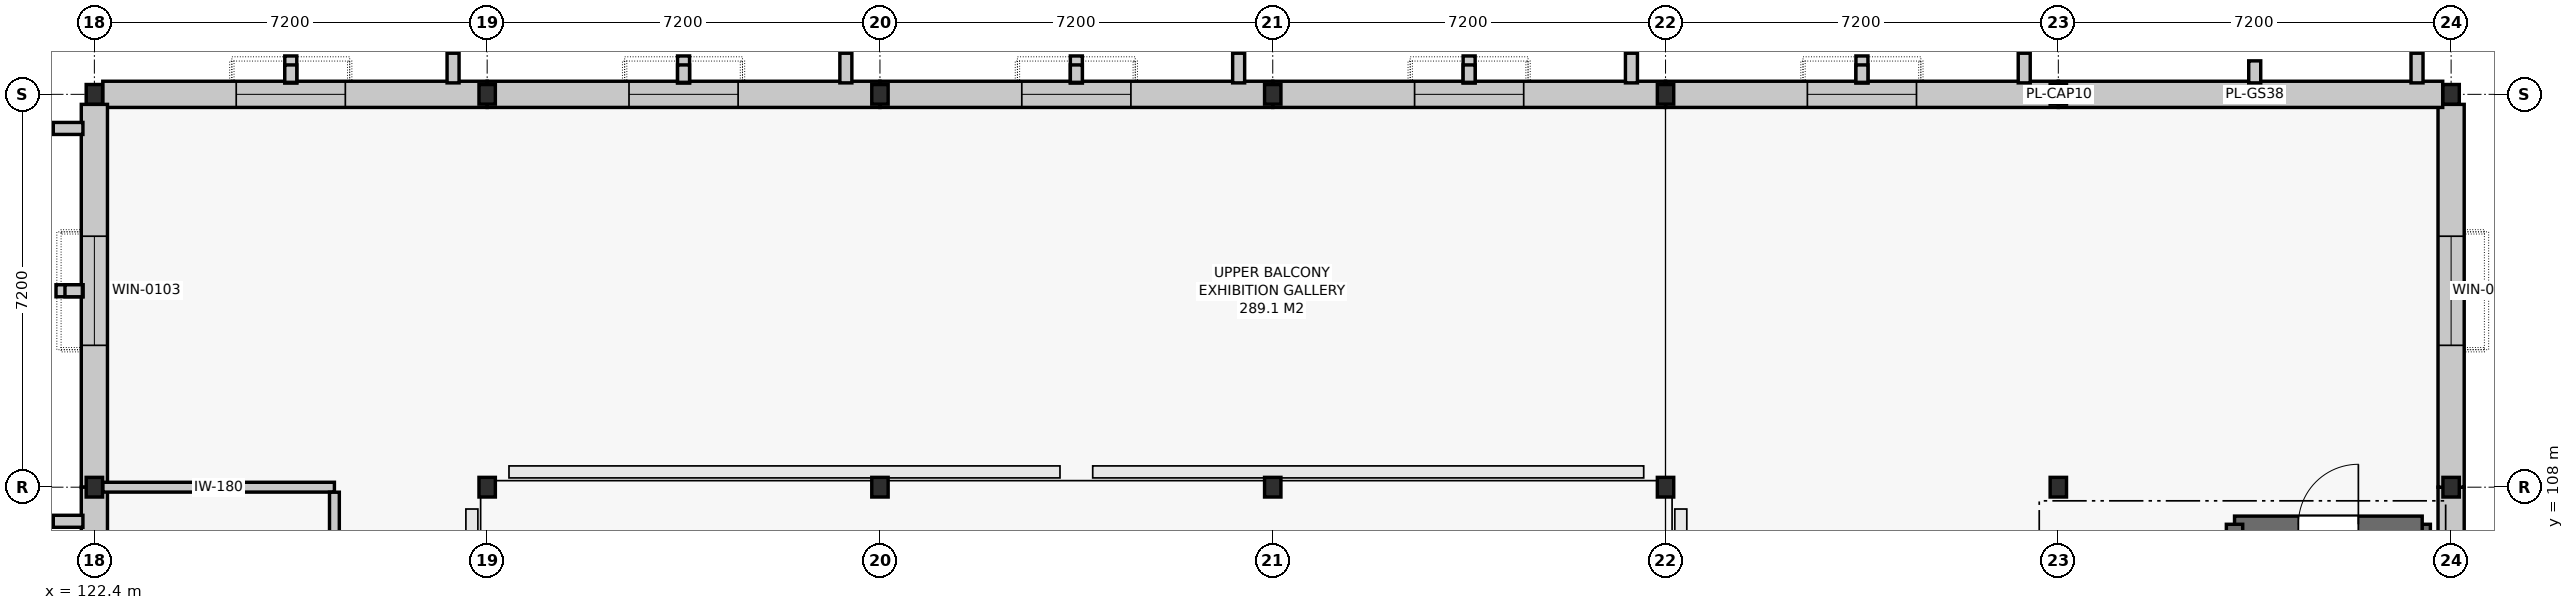
"""IFC4 building model, lengths in metres.
Left out: names, types, materials, properties, quantities, classifications, styles, units other than length and angle.
Written with IfcOpenShell. Run it as: python <this file> out.ifc"""

import sys

from ifc_helpers import new_model, si_unit, direction, frame, frame_2d, origin, origin_2d, place, context, subcontext, project, spatial, rectangle, i_section, extrude, element, fill, save


model = new_model("IFC4")
c1 = context("Model", 3, precision=1e-05, world=origin(), true_north=direction((0.0, 1.0)))
c2 = subcontext(c1, "Body", "Model", "MODEL_VIEW")
j1 = project(units=[si_unit("LENGTHUNIT", "METRE"), si_unit("PLANEANGLEUNIT", "RADIAN")], contexts=[c1])
p1 = place(None, origin())
s1 = spatial("IfcSite", under=j1, at=p1, CompositionType="ELEMENT")
p2 = place(p1, origin())
s2 = spatial("IfcBuilding", under=s1, at=p2, CompositionType="ELEMENT")
p3 = place(p2, frame((0.0, 0.0, 5.4)))
s3 = spatial("IfcBuildingStorey", under=s2, at=p3, CompositionType="ELEMENT", Elevation=5.4)
for number, where, z_axis, x_axis in (
    (1, (122.4, 108.0, 0.0), (0.0, 0.0, 1.0), (1.0, 0.0, 0.0)),
    (2, (122.4, 115.2, 0.0), (0.0, 0.0, 1.0), (1.0, 0.0, 0.0)),
    (3, (129.6, 108.0, 0.0), (0.0, 0.0, 1.0), (1.0, 0.0, 0.0)),
    (4, (129.6, 115.2, 0.0), (0.0, 0.0, 1.0), (1.0, 0.0, 0.0)),
    (5, (136.8, 108.0, 0.0), (0.0, 0.0, 1.0), (1.0, 0.0, 0.0)),
    (6, (136.8, 115.2, 0.0), (0.0, 0.0, 1.0), (1.0, 0.0, 0.0)),
    (7, (144.0, 108.0, 0.0), (0.0, 0.0, 1.0), (1.0, 0.0, 0.0)),
    (8, (144.0, 115.2, 0.0), (0.0, 0.0, 1.0), (1.0, 0.0, 0.0)),
    (9, (151.2, 108.0, 0.0), (0.0, 0.0, 1.0), (1.0, 0.0, 0.0)),
    (10, (151.2, 115.2, 0.0), (0.0, 0.0, 1.0), (1.0, 0.0, 0.0)),
    (11, (158.4, 108.0, 0.0), (0.0, 0.0, 1.0), (1.0, 0.0, 0.0)),
    (12, (158.4, 115.2, 0.0), (0.0, 0.0, 1.0), (1.0, 0.0, 0.0)),
    (13, (165.6, 108.0, 0.0), (0.0, 0.0, 1.0), (1.0, 0.0, 0.0)),
    (14, (165.6, 115.2, 0.0), (0.0, 0.0, 1.0), (1.0, 0.0, 0.0)),
):
    element("IfcColumn", number, at=place(p3, frame(where, z_axis=z_axis, x_axis=x_axis)), inside=s3, PredefinedType="COLUMN", context=c2, shape_type="SweptSolid", body=[
        extrude(i_section(OverallWidth=0.3, OverallDepth=0.36, WebThickness=0.012, FlangeThickness=0.022, FilletRadius=0.027, at=origin_2d()), origin(), (0.0, 0.0, 1.0), 4.8),
    ])
p4 = place(p3, frame((165.6, 100.8, 0.0), z_axis=(0.0, 0.0, 1.0), x_axis=(0.0, 1.0, 0.0)))
e15 = element("IfcWall", 15, at=p4, inside=s3, PredefinedType="SOLIDWALL", context=c2, shape_type="SweptSolid", body=[
    extrude(rectangle(XDim=7.2, YDim=0.48, at=frame_2d((3.6, 0.0))), origin(), (0.0, 0.0, 1.0), 3.8),
])
p5 = place(p4, frame((2.6, 0.0, 1.35)))
e16 = element("IfcOpeningElement", 16, at=p5, cuts=e15, PredefinedType="OPENING", context=c2, shape_type="SweptSolid", body=[
    extrude(rectangle(XDim=2.0, YDim=1.5, at=frame_2d((1.0, 0.75))), frame((0.0, 0.252, 0.0), z_axis=(0.0, -1.0, 0.0), x_axis=(1.0, 0.0, 0.0)), (0.0, 0.0, 1.0), 0.504),
])
p6 = place(p3, frame((165.6, 108.0, 0.0), z_axis=(0.0, 0.0, 1.0), x_axis=(0.0, 1.0, 0.0)))
e17 = element("IfcWall", 17, at=p6, inside=s3, PredefinedType="SOLIDWALL", context=c2, shape_type="SweptSolid", body=[
    extrude(rectangle(XDim=7.016, YDim=0.48, at=frame_2d((3.508, 0.0))), origin(), (0.0, 0.0, 1.0), 3.8),
])
p7 = place(p6, frame((2.6, 0.0, 1.35)))
e18 = element("IfcOpeningElement", 18, at=p7, cuts=e17, PredefinedType="OPENING", context=c2, shape_type="SweptSolid", body=[
    extrude(rectangle(XDim=2.0, YDim=1.5, at=frame_2d((1.0, 0.75))), frame((0.0, 0.252, 0.0), z_axis=(0.0, -1.0, 0.0), x_axis=(1.0, 0.0, 0.0)), (0.0, 0.0, 1.0), 0.504),
])
p8 = place(p3, frame((165.446, 115.2, 0.0), z_axis=(0.0, 0.0, 1.0), x_axis=(-1.0, 0.0, 0.0)))
e19 = element("IfcWall", 19, at=p8, inside=s3, PredefinedType="SOLIDWALL", context=c2, shape_type="SweptSolid", body=[
    extrude(rectangle(XDim=7.046, YDim=0.48, at=frame_2d((3.523, 0.0))), origin(), (0.0, 0.0, 1.0), 3.8),
])
p9 = place(p3, frame((158.4, 115.2, 0.0), z_axis=(0.0, 0.0, 1.0), x_axis=(-1.0, 0.0, 0.0)))
e20 = element("IfcWall", 20, at=p9, inside=s3, PredefinedType="SOLIDWALL", context=c2, shape_type="SweptSolid", body=[
    extrude(rectangle(XDim=7.2, YDim=0.48, at=frame_2d((3.6, 0.0))), origin(), (0.0, 0.0, 1.0), 3.8),
])
p10 = place(p9, frame((2.6, 0.0, 1.35)))
e21 = element("IfcOpeningElement", 21, at=p10, cuts=e20, PredefinedType="OPENING", context=c2, shape_type="SweptSolid", body=[
    extrude(rectangle(XDim=2.0, YDim=1.5, at=frame_2d((1.0, 0.75))), frame((0.0, 0.252, 0.0), z_axis=(0.0, -1.0, 0.0), x_axis=(1.0, 0.0, 0.0)), (0.0, 0.0, 1.0), 0.504),
])
p11 = place(p3, frame((151.2, 115.2, 0.0), z_axis=(0.0, 0.0, 1.0), x_axis=(-1.0, 0.0, 0.0)))
e22 = element("IfcWall", 22, at=p11, inside=s3, PredefinedType="SOLIDWALL", context=c2, shape_type="SweptSolid", body=[
    extrude(rectangle(XDim=7.2, YDim=0.48, at=frame_2d((3.6, 0.0))), origin(), (0.0, 0.0, 1.0), 3.8),
])
p12 = place(p11, frame((2.6, 0.0, 1.35)))
e23 = element("IfcOpeningElement", 23, at=p12, cuts=e22, PredefinedType="OPENING", context=c2, shape_type="SweptSolid", body=[
    extrude(rectangle(XDim=2.0, YDim=1.5, at=frame_2d((1.0, 0.75))), frame((0.0, 0.252, 0.0), z_axis=(0.0, -1.0, 0.0), x_axis=(1.0, 0.0, 0.0)), (0.0, 0.0, 1.0), 0.504),
])
p13 = place(p3, frame((144.0, 115.2, 0.0), z_axis=(0.0, 0.0, 1.0), x_axis=(-1.0, 0.0, 0.0)))
e24 = element("IfcWall", 24, at=p13, inside=s3, PredefinedType="SOLIDWALL", context=c2, shape_type="SweptSolid", body=[
    extrude(rectangle(XDim=7.2, YDim=0.48, at=frame_2d((3.6, 0.0))), origin(), (0.0, 0.0, 1.0), 3.8),
])
p14 = place(p13, frame((2.6, 0.0, 1.35)))
e25 = element("IfcOpeningElement", 25, at=p14, cuts=e24, PredefinedType="OPENING", context=c2, shape_type="SweptSolid", body=[
    extrude(rectangle(XDim=2.0, YDim=1.5, at=frame_2d((1.0, 0.75))), frame((0.0, 0.252, 0.0), z_axis=(0.0, -1.0, 0.0), x_axis=(1.0, 0.0, 0.0)), (0.0, 0.0, 1.0), 0.504),
])
p15 = place(p3, frame((136.8, 115.2, 0.0), z_axis=(0.0, 0.0, 1.0), x_axis=(-1.0, 0.0, 0.0)))
e26 = element("IfcWall", 26, at=p15, inside=s3, PredefinedType="SOLIDWALL", context=c2, shape_type="SweptSolid", body=[
    extrude(rectangle(XDim=7.2, YDim=0.48, at=frame_2d((3.6, 0.0))), origin(), (0.0, 0.0, 1.0), 3.8),
])
p16 = place(p15, frame((2.6, 0.0, 1.35)))
e27 = element("IfcOpeningElement", 27, at=p16, cuts=e26, PredefinedType="OPENING", context=c2, shape_type="SweptSolid", body=[
    extrude(rectangle(XDim=2.0, YDim=1.5, at=frame_2d((1.0, 0.75))), frame((0.0, 0.252, 0.0), z_axis=(0.0, -1.0, 0.0), x_axis=(1.0, 0.0, 0.0)), (0.0, 0.0, 1.0), 0.504),
])
p17 = place(p3, frame((129.6, 115.2, 0.0), z_axis=(0.0, 0.0, 1.0), x_axis=(-1.0, 0.0, 0.0)))
e28 = element("IfcWall", 28, at=p17, inside=s3, PredefinedType="SOLIDWALL", context=c2, shape_type="SweptSolid", body=[
    extrude(rectangle(XDim=7.046, YDim=0.48, at=frame_2d((3.523, 0.0))), origin(), (0.0, 0.0, 1.0), 3.8),
])
p18 = place(p17, frame((2.6, 0.0, 1.35)))
e29 = element("IfcOpeningElement", 29, at=p18, cuts=e28, PredefinedType="OPENING", context=c2, shape_type="SweptSolid", body=[
    extrude(rectangle(XDim=2.0, YDim=1.5, at=frame_2d((1.0, 0.75))), frame((0.0, 0.252, 0.0), z_axis=(0.0, -1.0, 0.0), x_axis=(1.0, 0.0, 0.0)), (0.0, 0.0, 1.0), 0.504),
])
p19 = place(p3, frame((122.4, 115.016, 0.0), z_axis=(0.0, 0.0, 1.0), x_axis=(0.0, -1.0, 0.0)))
e30 = element("IfcWall", 30, at=p19, inside=s3, PredefinedType="SOLIDWALL", context=c2, shape_type="SweptSolid", body=[
    extrude(rectangle(XDim=7.016, YDim=0.48, at=frame_2d((3.508, 0.0))), origin(), (0.0, 0.0, 1.0), 3.8),
])
p20 = place(p19, frame((2.416, 0.0, 1.35)))
e31 = element("IfcOpeningElement", 31, at=p20, cuts=e30, PredefinedType="OPENING", context=c2, shape_type="SweptSolid", body=[
    extrude(rectangle(XDim=2.0, YDim=1.5, at=frame_2d((1.0, 0.75))), frame((0.0, 0.252, 0.0), z_axis=(0.0, -1.0, 0.0), x_axis=(1.0, 0.0, 0.0)), (0.0, 0.0, 1.0), 0.504),
])
p21 = place(p3, frame((122.4, 108.0, 0.0), z_axis=(0.0, 0.0, 1.0), x_axis=(0.0, -1.0, 0.0)))
e32 = element("IfcWall", 32, at=p21, inside=s3, PredefinedType="SOLIDWALL", context=c2, shape_type="SweptSolid", body=[
    extrude(rectangle(XDim=7.2, YDim=0.48, at=frame_2d((3.6, 0.0))), origin(), (0.0, 0.0, 1.0), 3.8),
])
p22 = place(p21, frame((2.6, 0.0, 1.35)))
e33 = element("IfcOpeningElement", 33, at=p22, cuts=e32, PredefinedType="OPENING", context=c2, shape_type="SweptSolid", body=[
    extrude(rectangle(XDim=2.0, YDim=1.5, at=frame_2d((1.0, 0.75))), frame((0.0, 0.252, 0.0), z_axis=(0.0, -1.0, 0.0), x_axis=(1.0, 0.0, 0.0)), (0.0, 0.0, 1.0), 0.504),
])
p23 = place(p3, frame((165.07, 100.38, 0.0), z_axis=(0.0, 0.0, 1.0), x_axis=(0.0, 1.0, 0.0)))
e34 = element("IfcWall", 34, at=p23, inside=s3, PredefinedType="SHEAR", context=c2, shape_type="SweptSolid", body=[
    extrude(rectangle(XDim=6.94, YDim=0.3, at=frame_2d((3.47, 0.0))), origin(), (0.0, 0.0, 1.0), 4.52),
])
p24 = place(p3, frame((165.07, 107.32, 0.0), z_axis=(0.0, 0.0, 1.0), x_axis=(-1.0, 0.0, 0.0)))
e35 = element("IfcWall", 35, at=p24, inside=s3, PredefinedType="SHEAR", context=c2, shape_type="SweptSolid", body=[
    extrude(rectangle(XDim=3.44, YDim=0.3, at=frame_2d((1.72, 0.0))), origin(), (0.0, 0.0, 1.0), 4.52),
])
p25 = place(p24, frame((1.17, 0.0, 0.0)))
e36 = element("IfcOpeningElement", 36, at=p25, cuts=e35, PredefinedType="OPENING", context=c2, shape_type="SweptSolid", body=[
    extrude(rectangle(XDim=1.1, YDim=2.15, at=frame_2d((0.55, 1.075))), frame((0.0, 0.162, 0.0), z_axis=(0.0, -1.0, 0.0), x_axis=(1.0, 0.0, 0.0)), (0.0, 0.0, 1.0), 0.324),
])
p26 = place(p3, frame((161.63, 107.32, 0.0), z_axis=(0.0, 0.0, 1.0), x_axis=(0.0, -1.0, 0.0)))
e37 = element("IfcWall", 37, at=p26, inside=s3, PredefinedType="SHEAR", context=c2, shape_type="SweptSolid", body=[
    extrude(rectangle(XDim=6.94, YDim=0.3, at=frame_2d((3.47, 0.0))), origin(), (0.0, 0.0, 1.0), 4.52),
])
p27 = place(p3, frame((122.554, 108.0, 0.0), z_axis=(0.0, 0.0, 1.0), x_axis=(1.0, 0.0, 0.0)))
e38 = element("IfcWall", 38, at=p27, inside=s3, PredefinedType="PARTITIONING", context=c2, shape_type="SweptSolid", body=[
    extrude(rectangle(XDim=4.246, YDim=0.18, at=frame_2d((2.123, 0.0))), origin(), (0.0, 0.0, 1.0), 4.065),
])
p28 = place(p3, frame((126.8, 99.477, 0.0), z_axis=(0.0, 0.0, 1.0), x_axis=(0.0, 1.0, 0.0)))
e39 = element("IfcWall", 39, at=p28, inside=s3, PredefinedType="PARTITIONING", context=c2, shape_type="SweptSolid", body=[
    extrude(rectangle(XDim=8.431, YDim=0.18, at=frame_2d((4.215, 0.0))), origin(), (0.0, 0.0, 1.0), 4.065),
])
p29 = place(p28, frame((3.676, 0.0, 0.0)))
e40 = element("IfcOpeningElement", 40, at=p29, cuts=e39, PredefinedType="OPENING", context=c2, shape_type="SweptSolid", body=[
    extrude(rectangle(XDim=1.08, YDim=2.2, at=frame_2d((0.54, 1.1))), frame((0.0, 0.102, 0.0), z_axis=(0.0, -1.0, 0.0), x_axis=(1.0, 0.0, 0.0)), (0.0, 0.0, 1.0), 0.204),
])
p30 = place(p7, origin())
e41 = element("IfcWindow", 41, at=p30, inside=s3, PartitioningType="SINGLE_PANEL", PredefinedType="WINDOW", context=c2, shape_type="SweptSolid", body=[
    extrude(rectangle(XDim=2.0, YDim=1.5, at=frame_2d((1.0, 0.75))), frame((0.0, 0.03, 0.0), z_axis=(0.0, -1.0, 0.0), x_axis=(1.0, 0.0, 0.0)), (0.0, 0.0, 1.0), 0.06),
])
fill(e18, e41)
p31 = place(p10, origin())
e42 = element("IfcWindow", 42, at=p31, inside=s3, PartitioningType="SINGLE_PANEL", PredefinedType="WINDOW", context=c2, shape_type="SweptSolid", body=[
    extrude(rectangle(XDim=2.0, YDim=1.5, at=frame_2d((1.0, 0.75))), frame((0.0, 0.03, 0.0), z_axis=(0.0, -1.0, 0.0), x_axis=(1.0, 0.0, 0.0)), (0.0, 0.0, 1.0), 0.06),
])
fill(e21, e42)
p32 = place(p12, origin())
e43 = element("IfcWindow", 43, at=p32, inside=s3, PartitioningType="SINGLE_PANEL", PredefinedType="WINDOW", context=c2, shape_type="SweptSolid", body=[
    extrude(rectangle(XDim=2.0, YDim=1.5, at=frame_2d((1.0, 0.75))), frame((0.0, 0.03, 0.0), z_axis=(0.0, -1.0, 0.0), x_axis=(1.0, 0.0, 0.0)), (0.0, 0.0, 1.0), 0.06),
])
fill(e23, e43)
p33 = place(p14, origin())
e44 = element("IfcWindow", 44, at=p33, inside=s3, PartitioningType="SINGLE_PANEL", PredefinedType="WINDOW", context=c2, shape_type="SweptSolid", body=[
    extrude(rectangle(XDim=2.0, YDim=1.5, at=frame_2d((1.0, 0.75))), frame((0.0, 0.03, 0.0), z_axis=(0.0, -1.0, 0.0), x_axis=(1.0, 0.0, 0.0)), (0.0, 0.0, 1.0), 0.06),
])
fill(e25, e44)
p34 = place(p16, origin())
e45 = element("IfcWindow", 45, at=p34, inside=s3, PartitioningType="SINGLE_PANEL", PredefinedType="WINDOW", context=c2, shape_type="SweptSolid", body=[
    extrude(rectangle(XDim=2.0, YDim=1.5, at=frame_2d((1.0, 0.75))), frame((0.0, 0.03, 0.0), z_axis=(0.0, -1.0, 0.0), x_axis=(1.0, 0.0, 0.0)), (0.0, 0.0, 1.0), 0.06),
])
fill(e27, e45)
p35 = place(p18, origin())
e46 = element("IfcWindow", 46, at=p35, inside=s3, PartitioningType="SINGLE_PANEL", PredefinedType="WINDOW", context=c2, shape_type="SweptSolid", body=[
    extrude(rectangle(XDim=2.0, YDim=1.5, at=frame_2d((1.0, 0.75))), frame((0.0, 0.03, 0.0), z_axis=(0.0, -1.0, 0.0), x_axis=(1.0, 0.0, 0.0)), (0.0, 0.0, 1.0), 0.06),
])
fill(e29, e46)
p36 = place(p20, origin())
e47 = element("IfcWindow", 47, at=p36, inside=s3, PartitioningType="SINGLE_PANEL", PredefinedType="WINDOW", context=c2, shape_type="SweptSolid", body=[
    extrude(rectangle(XDim=2.0, YDim=1.5, at=frame_2d((1.0, 0.75))), frame((0.0, 0.03, 0.0), z_axis=(0.0, -1.0, 0.0), x_axis=(1.0, 0.0, 0.0)), (0.0, 0.0, 1.0), 0.06),
])
fill(e31, e47)
p37 = place(p25, frame((1.1, 0.0, 0.0), z_axis=(0.0, 0.0, 1.0), x_axis=(-1.0, 0.0, 0.0)))
e48 = element("IfcDoor", 48, at=p37, inside=s3, OperationType="SINGLE_SWING_RIGHT", PredefinedType="DOOR", context=c2, shape_type="SweptSolid", body=[
    extrude(rectangle(XDim=1.1, YDim=2.15, at=frame_2d((0.55, 1.075))), frame((0.0, 0.025, 0.0), z_axis=(0.0, -1.0, 0.0), x_axis=(1.0, 0.0, 0.0)), (0.0, 0.0, 1.0), 0.05),
])
fill(e36, e48)
save(model, sys.argv[1])
